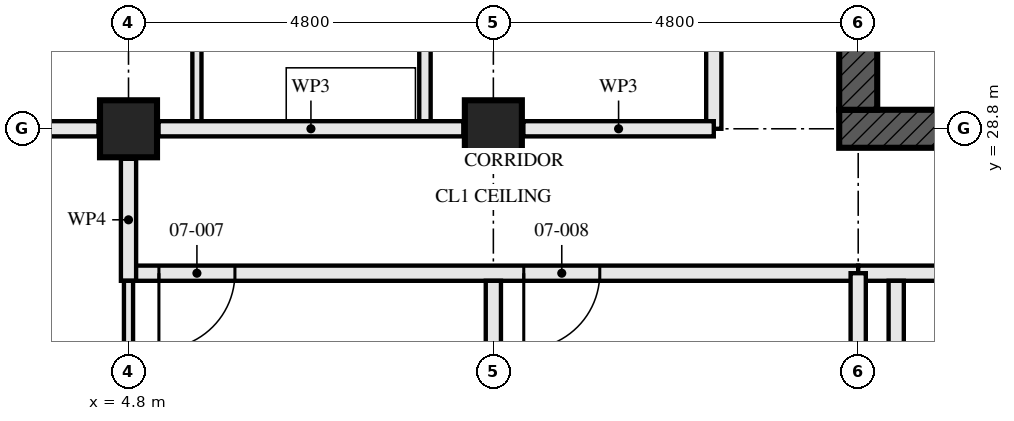
"""IFC4 building model, lengths in metres.
Left out: names, types, materials, properties, quantities, classifications, styles, units other than length and angle.
Written with IfcOpenShell. Run it as: python <this file> out.ifc"""

import sys

from ifc_helpers import new_model, si_unit, direction, frame, frame_2d, origin, origin_2d, place, context, subcontext, project, spatial, rectangle, hollow_rectangle, extrude, element, fill, save


model = new_model("IFC4")
c1 = context("Model", 3, precision=1e-05, world=origin(), true_north=direction((0.0, 1.0)))
c2 = subcontext(c1, "Body", "Model", "MODEL_VIEW")
j1 = project(units=[si_unit("LENGTHUNIT", "METRE"), si_unit("PLANEANGLEUNIT", "RADIAN")], contexts=[c1])
p1 = place(None, origin())
s1 = spatial("IfcSite", under=j1, at=p1, CompositionType="ELEMENT")
p2 = place(p1, origin())
s2 = spatial("IfcBuilding", under=s1, at=p2, CompositionType="ELEMENT")
p3 = place(p2, frame((0.0, 0.0, 30.5)))
s3 = spatial("IfcBuildingStorey", under=s2, at=p3, CompositionType="ELEMENT", Elevation=30.5)
for number, where, z_axis, x_axis in (
    (1, (4.8, 28.8, 0.0), (0.0, 0.0, 1.0), (0.0, 1.0, 0.0)),
    (2, (9.6, 28.8, 0.0), (0.0, 0.0, 1.0), (0.0, 1.0, 0.0)),
):
    element("IfcColumn", number, at=place(p3, frame(where, z_axis=z_axis, x_axis=x_axis)), inside=s3, PredefinedType="COLUMN", context=c2, shape_type="SweptSolid", body=[
        extrude(hollow_rectangle(XDim=0.75, YDim=0.75, WallThickness=0.08, at=origin_2d()), origin(), (0.0, 0.0, 1.0), 3.5),
    ])
p4 = place(p3, frame((14.15, 28.8, -0.17), z_axis=(0.0, 0.0, 1.0), x_axis=(1.0, 0.0, 0.0)))
e3 = element("IfcWall", 3, at=p4, inside=s3, PredefinedType="SHEAR", context=c2, shape_type="SweptSolid", body=[
    extrude(rectangle(XDim=14.9, YDim=0.5, at=frame_2d((7.45, 0.0))), origin(), (0.0, 0.0, 1.0), 3.5),
])
p5 = place(p4, frame((6.85, 0.0, 0.17)))
e4 = element("IfcOpeningElement", 4, at=p5, cuts=e3, PredefinedType="OPENING", context=c2, shape_type="SweptSolid", body=[
    extrude(rectangle(XDim=1.2, YDim=2.1, at=frame_2d((0.6, 1.05))), frame((0.0, 0.26, 0.0), z_axis=(0.0, -1.0, 0.0), x_axis=(1.0, 0.0, 0.0)), (0.0, 0.0, 1.0), 0.521),
])
p6 = place(p3, frame((14.4, 42.95, -0.17), z_axis=(0.0, 0.0, 1.0), x_axis=(0.0, -1.0, 0.0)))
e5 = element("IfcWall", 5, at=p6, inside=s3, PredefinedType="SHEAR", context=c2, shape_type="SweptSolid", body=[
    extrude(rectangle(XDim=13.9, YDim=0.5, at=frame_2d((6.95, 0.0))), origin(), (0.0, 0.0, 1.0), 3.5),
])
p7 = place(p6, frame((6.35, 0.0, 0.17)))
e6 = element("IfcOpeningElement", 6, at=p7, cuts=e5, PredefinedType="OPENING", context=c2, shape_type="SweptSolid", body=[
    extrude(rectangle(XDim=1.2, YDim=2.1, at=frame_2d((0.6, 1.05))), frame((0.0, 0.26, 0.0), z_axis=(0.0, -1.0, 0.0), x_axis=(1.0, 0.0, 0.0)), (0.0, 0.0, 1.0), 0.521),
])
p8 = place(p3, frame((4.8, 23.8, 0.0), z_axis=(0.0, 0.0, 1.0), x_axis=(0.0, 1.0, 0.0)))
e7 = element("IfcWall", 7, at=p8, inside=s3, PredefinedType="PARTITIONING", context=c2, shape_type="SweptSolid", body=[
    extrude(rectangle(XDim=3.0, YDim=0.12, at=frame_2d((1.5, 0.0))), origin(), (0.0, 0.0, 1.0), 2.55),
])
p9 = place(p8, frame((1.075, 0.0, 0.0)))
e8 = element("IfcOpeningElement", 8, at=p9, cuts=e7, PredefinedType="OPENING", context=c2, shape_type="SweptSolid", body=[
    extrude(rectangle(XDim=0.9, YDim=2.1, at=frame_2d((0.45, 1.05))), frame((0.0, 0.071, 0.0), z_axis=(0.0, -1.0, 0.0), x_axis=(1.0, 0.0, 0.0)), (0.0, 0.0, 1.0), 0.141),
])
p10 = place(p3, frame((9.6, 14.647, 0.0), z_axis=(0.0, 0.0, 1.0), x_axis=(0.0, 1.0, 0.0)))
e9 = element("IfcWall", 9, at=p10, inside=s3, PredefinedType="PARTITIONING", context=c2, shape_type="SweptSolid", body=[
    extrude(rectangle(XDim=12.153, YDim=0.2, at=frame_2d((6.077, 0.0))), origin(), (0.0, 0.0, 1.0), 2.55),
])
p11 = place(p3, frame((4.8, 26.9, 0.0), z_axis=(0.0, 0.0, 1.0), x_axis=(1.0, 0.0, 0.0)))
e10 = element("IfcWall", 10, at=p11, inside=s3, PredefinedType="PARTITIONING", context=c2, shape_type="SweptSolid", body=[
    extrude(rectangle(XDim=9.6, YDim=0.2, at=frame_2d((4.8, 0.0))), origin(), (0.0, 0.0, 1.0), 3.33),
])
p12 = place(p11, frame((0.4, 0.0, 0.0)))
e11 = element("IfcOpeningElement", 11, at=p12, cuts=e10, PredefinedType="OPENING", context=c2, shape_type="SweptSolid", body=[
    extrude(rectangle(XDim=1.0, YDim=2.1, at=frame_2d((0.5, 1.05))), frame((0.0, 0.111, 0.0), z_axis=(0.0, -1.0, 0.0), x_axis=(1.0, 0.0, 0.0)), (0.0, 0.0, 1.0), 0.221),
])
p13 = place(p11, frame((5.2, 0.0, 0.0)))
e12 = element("IfcOpeningElement", 12, at=p13, cuts=e10, PredefinedType="OPENING", context=c2, shape_type="SweptSolid", body=[
    extrude(rectangle(XDim=1.0, YDim=2.1, at=frame_2d((0.5, 1.05))), frame((0.0, 0.111, 0.0), z_axis=(0.0, -1.0, 0.0), x_axis=(1.0, 0.0, 0.0)), (0.0, 0.0, 1.0), 0.221),
])
p14 = place(p3, frame((4.8, 26.8, 0.0), z_axis=(0.0, 0.0, 1.0), x_axis=(0.0, 1.0, 0.0)))
e13 = element("IfcWall", 13, at=p14, inside=s3, PredefinedType="PARTITIONING", context=c2, shape_type="SweptSolid", body=[
    extrude(rectangle(XDim=1.605, YDim=0.2, at=frame_2d((0.802, 0.0))), origin(), (0.0, 0.0, 1.0), 3.33),
])
p15 = place(p3, frame((8.7, 31.6, 0.0), z_axis=(0.0, 0.0, 1.0), x_axis=(0.0, -1.0, 0.0)))
e14 = element("IfcWall", 14, at=p15, inside=s3, PredefinedType="PARTITIONING", context=c2, shape_type="SweptSolid", body=[
    extrude(rectangle(XDim=2.8, YDim=0.15, at=frame_2d((1.4, 0.0))), origin(), (0.0, 0.0, 1.0), 3.33),
])
p16 = place(p3, frame((5.7, 33.6, 0.0), z_axis=(0.0, 0.0, 1.0), x_axis=(0.0, -1.0, 0.0)))
e15 = element("IfcWall", 15, at=p16, inside=s3, PredefinedType="PARTITIONING", context=c2, shape_type="SweptSolid", body=[
    extrude(rectangle(XDim=4.8, YDim=0.12, at=frame_2d((2.4, 0.0))), origin(), (0.0, 0.0, 1.0), 3.33),
])
p17 = place(p16, frame((0.45, 0.0, 0.0)))
e16 = element("IfcOpeningElement", 16, at=p17, cuts=e15, PredefinedType="OPENING", context=c2, shape_type="SweptSolid", body=[
    extrude(rectangle(XDim=0.9, YDim=2.1, at=frame_2d((0.45, 1.05))), frame((0.0, 0.071, 0.0), z_axis=(0.0, -1.0, 0.0), x_axis=(1.0, 0.0, 0.0)), (0.0, 0.0, 1.0), 0.141),
])
p18 = place(p3, frame((12.5, 43.2, 0.0), z_axis=(0.0, 0.0, 1.0), x_axis=(0.0, -1.0, 0.0)))
e17 = element("IfcWall", 17, at=p18, inside=s3, PredefinedType="PARTITIONING", context=c2, shape_type="SweptSolid", body=[
    extrude(rectangle(XDim=14.4, YDim=0.2, at=frame_2d((7.2, 0.0))), origin(), (0.0, 0.0, 1.0), 2.55),
])
p19 = place(p18, frame((1.4, 0.0, 0.0)))
e18 = element("IfcOpeningElement", 18, at=p19, cuts=e17, PredefinedType="OPENING", context=c2, shape_type="SweptSolid", body=[
    extrude(rectangle(XDim=1.0, YDim=2.1, at=frame_2d((0.5, 1.05))), frame((0.0, 0.111, 0.0), z_axis=(0.0, -1.0, 0.0), x_axis=(1.0, 0.0, 0.0)), (0.0, 0.0, 1.0), 0.221),
])
p20 = place(p18, frame((5.2, 0.0, 0.0)))
e19 = element("IfcOpeningElement", 19, at=p20, cuts=e17, PredefinedType="OPENING", context=c2, shape_type="SweptSolid", body=[
    extrude(rectangle(XDim=1.0, YDim=2.1, at=frame_2d((0.5, 1.05))), frame((0.0, 0.111, 0.0), z_axis=(0.0, -1.0, 0.0), x_axis=(1.0, 0.0, 0.0)), (0.0, 0.0, 1.0), 0.221),
])
p21 = place(p18, frame((10.0, 0.0, 0.0)))
e20 = element("IfcOpeningElement", 20, at=p21, cuts=e17, PredefinedType="OPENING", context=c2, shape_type="SweptSolid", body=[
    extrude(rectangle(XDim=1.0, YDim=2.1, at=frame_2d((0.5, 1.05))), frame((0.0, 0.111, 0.0), z_axis=(0.0, -1.0, 0.0), x_axis=(1.0, 0.0, 0.0)), (0.0, 0.0, 1.0), 0.221),
])
p22 = place(p3, frame((14.9, 22.1, 0.0), z_axis=(0.0, 0.0, 1.0), x_axis=(0.0, 1.0, 0.0)))
e21 = element("IfcWall", 21, at=p22, inside=s3, PredefinedType="SOLIDWALL", context=c2, shape_type="SweptSolid", body=[
    extrude(rectangle(XDim=4.7, YDim=0.2, at=frame_2d((2.35, 0.0))), origin(), (0.0, 0.0, 1.0), 2.99),
])
p23 = place(p3, frame((14.4, 26.9, 0.0), z_axis=(0.0, 0.0, 1.0), x_axis=(1.0, 0.0, 0.0)))
e22 = element("IfcWall", 22, at=p23, inside=s3, PredefinedType="PARTITIONING", context=c2, shape_type="SweptSolid", body=[
    extrude(rectangle(XDim=14.4, YDim=0.2, at=frame_2d((7.2, 0.0))), origin(), (0.0, 0.0, 1.0), 2.55),
])
p24 = place(p23, frame((1.4, 0.0, 0.0)))
e23 = element("IfcOpeningElement", 23, at=p24, cuts=e22, PredefinedType="OPENING", context=c2, shape_type="SweptSolid", body=[
    extrude(rectangle(XDim=1.0, YDim=2.1, at=frame_2d((0.5, 1.05))), frame((0.0, 0.111, 0.0), z_axis=(0.0, -1.0, 0.0), x_axis=(1.0, 0.0, 0.0)), (0.0, 0.0, 1.0), 0.221),
])
p25 = place(p23, frame((5.2, 0.0, 0.0)))
e24 = element("IfcOpeningElement", 24, at=p25, cuts=e22, PredefinedType="OPENING", context=c2, shape_type="SweptSolid", body=[
    extrude(rectangle(XDim=1.0, YDim=2.1, at=frame_2d((0.5, 1.05))), frame((0.0, 0.111, 0.0), z_axis=(0.0, -1.0, 0.0), x_axis=(1.0, 0.0, 0.0)), (0.0, 0.0, 1.0), 0.221),
])
p26 = place(p23, frame((10.0, 0.0, 0.0)))
e25 = element("IfcOpeningElement", 25, at=p26, cuts=e22, PredefinedType="OPENING", context=c2, shape_type="SweptSolid", body=[
    extrude(rectangle(XDim=1.0, YDim=2.1, at=frame_2d((0.5, 1.05))), frame((0.0, 0.111, 0.0), z_axis=(0.0, -1.0, 0.0), x_axis=(1.0, 0.0, 0.0)), (0.0, 0.0, 1.0), 0.221),
])
p27 = place(p3, frame((12.5, 28.8, 0.0), z_axis=(0.0, 0.0, 1.0), x_axis=(-1.0, 0.0, 0.0)))
e26 = element("IfcWall", 26, at=p27, inside=s3, PredefinedType="PARTITIONING", context=c2, shape_type="SweptSolid", body=[
    extrude(rectangle(XDim=2.505, YDim=0.2, at=frame_2d((1.252, 0.0))), origin(), (0.0, 0.0, 1.0), 2.32),
])
p28 = place(p3, frame((9.205, 28.8, 0.0), z_axis=(0.0, 0.0, 1.0), x_axis=(-1.0, 0.0, 0.0)))
e27 = element("IfcWall", 27, at=p28, inside=s3, PredefinedType="PARTITIONING", context=c2, shape_type="SweptSolid", body=[
    extrude(rectangle(XDim=4.01, YDim=0.2, at=frame_2d((2.005, 0.0))), origin(), (0.0, 0.0, 1.0), 2.32),
])
p29 = place(p3, frame((4.405, 28.8, 0.0), z_axis=(0.0, 0.0, 1.0), x_axis=(-1.0, 0.0, 0.0)))
e28 = element("IfcWall", 28, at=p29, inside=s3, PredefinedType="PARTITIONING", context=c2, shape_type="SweptSolid", body=[
    extrude(rectangle(XDim=4.101, YDim=0.2, at=frame_2d((2.05, 0.0))), origin(), (0.0, 0.0, 1.0), 2.32),
])
p30 = place(p3, frame((14.4, 24.395, 0.0), z_axis=(0.0, 0.0, 1.0), x_axis=(0.0, 1.0, 0.0)))
e29 = element("IfcWall", 29, at=p30, inside=s3, PredefinedType="PARTITIONING", context=c2, shape_type="SweptSolid", body=[
    extrude(rectangle(XDim=2.505, YDim=0.2, at=frame_2d((1.252, 0.0))), origin(), (0.0, 0.0, 1.0), 2.32),
])
p31 = place(p12, frame((1.0, 0.0, 0.0), z_axis=(0.0, 0.0, 1.0), x_axis=(-1.0, 0.0, 0.0)))
e30 = element("IfcDoor", 30, at=p31, inside=s3, OperationType="SINGLE_SWING_LEFT", PredefinedType="DOOR", context=c2, shape_type="SweptSolid", body=[
    extrude(rectangle(XDim=1.0, YDim=2.1, at=frame_2d((0.5, 1.05))), frame((0.0, 0.027, 0.0), z_axis=(0.0, -1.0, 0.0), x_axis=(1.0, 0.0, 0.0)), (0.0, 0.0, 1.0), 0.054),
])
fill(e11, e30)
p32 = place(p13, frame((1.0, 0.0, 0.0), z_axis=(0.0, 0.0, 1.0), x_axis=(-1.0, 0.0, 0.0)))
e31 = element("IfcDoor", 31, at=p32, inside=s3, OperationType="SINGLE_SWING_LEFT", PredefinedType="DOOR", context=c2, shape_type="SweptSolid", body=[
    extrude(rectangle(XDim=1.0, YDim=2.1, at=frame_2d((0.5, 1.05))), frame((0.0, 0.027, 0.0), z_axis=(0.0, -1.0, 0.0), x_axis=(1.0, 0.0, 0.0)), (0.0, 0.0, 1.0), 0.054),
])
fill(e12, e31)
save(model, sys.argv[1])
